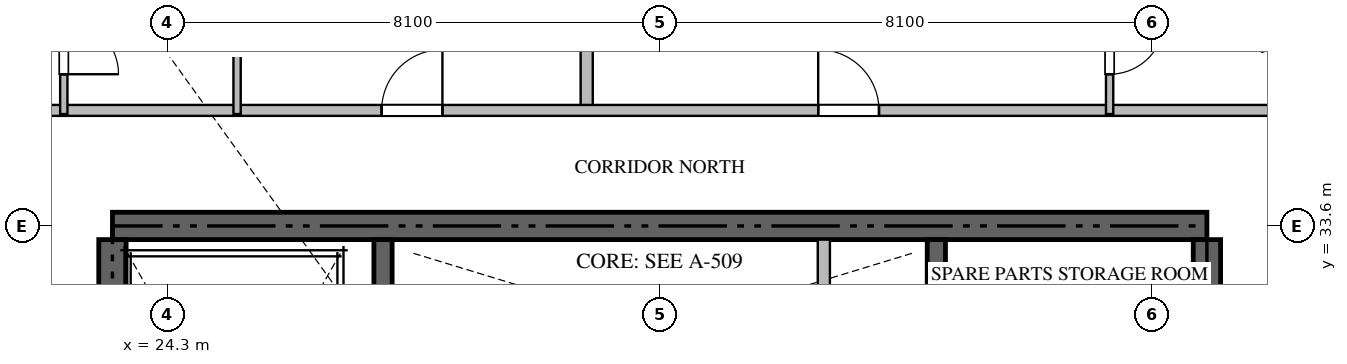
"""IFC4 building model, lengths in metres.
Left out: names, types, materials, properties, quantities, classifications, styles, units other than length and angle.
Written with IfcOpenShell. Run it as: python <this file> out.ifc"""

import sys

from ifc_helpers import new_model, si_unit, direction, frame, frame_2d, origin, place, context, subcontext, project, spatial, rectangle, extrude, source, transform, mapped, element, fill, save


model = new_model("IFC4")
c1 = context("Model", 3, precision=1e-05, world=origin(), true_north=direction((0.0, 1.0)))
c2 = subcontext(c1, "Body", "Model", "MODEL_VIEW")
j1 = project(units=[si_unit("LENGTHUNIT", "METRE"), si_unit("PLANEANGLEUNIT", "RADIAN")], contexts=[c1])
p1 = place(None, origin())
s1 = spatial("IfcSite", under=j1, at=p1, CompositionType="ELEMENT")
p2 = place(p1, origin())
s2 = spatial("IfcBuilding", under=s1, at=p2, CompositionType="ELEMENT")
p3 = place(p2, frame((0.0, 0.0, 64.2)))
s3 = spatial("IfcBuildingStorey", under=s2, at=p3, CompositionType="ELEMENT", Elevation=64.2)
p4 = place(p3, frame((41.4, 33.6, -0.26), z_axis=(0.0, 0.0, 1.0), x_axis=(-1.0, 0.0, 0.0)))
e1 = element("IfcWall", 1, at=p4, inside=s3, PredefinedType="SHEAR", context=c2, shape_type="SweptSolid", body=[
    extrude(rectangle(XDim=18.0, YDim=0.45, at=frame_2d((9.0, 0.0))), origin(), (0.0, 0.0, 1.0), 3.748),
])
p5 = place(p3, frame((23.4, 24.25, -0.26), z_axis=(0.0, 0.0, 1.0), x_axis=(0.0, 1.0, 0.0)))
e2 = element("IfcWall", 2, at=p5, inside=s3, PredefinedType="SHEAR", context=c2, shape_type="SweptSolid", body=[
    extrude(rectangle(XDim=9.125, YDim=0.45, at=frame_2d((4.562, 0.0))), origin(), (0.0, 0.0, 1.0), 3.748),
])
p6 = place(p3, frame((41.4, 27.75, -0.26), z_axis=(0.0, 0.0, 1.0), x_axis=(0.0, 1.0, 0.0)))
e3 = element("IfcWall", 3, at=p6, inside=s3, PredefinedType="SHEAR", context=c2, shape_type="SweptSolid", body=[
    extrude(rectangle(XDim=5.625, YDim=0.45, at=frame_2d((2.812, 0.0))), origin(), (0.0, 0.0, 1.0), 3.748),
])
p7 = place(p3, frame((27.85, 23.55, -0.26), z_axis=(0.0, 0.0, 1.0), x_axis=(0.0, 1.0, 0.0)))
e4 = element("IfcWall", 4, at=p7, inside=s3, PredefinedType="SHEAR", context=c2, shape_type="SweptSolid", body=[
    extrude(rectangle(XDim=9.825, YDim=0.3, at=frame_2d((4.913, 0.0))), origin(), (0.0, 0.0, 1.0), 3.748),
])
p8 = place(p3, frame((36.95, 27.05, -0.26), z_axis=(0.0, 0.0, 1.0), x_axis=(0.0, 1.0, 0.0)))
e5 = element("IfcWall", 5, at=p8, inside=s3, PredefinedType="SHEAR", context=c2, shape_type="SweptSolid", body=[
    extrude(rectangle(XDim=6.325, YDim=0.3, at=frame_2d((3.163, 0.0))), origin(), (0.0, 0.0, 1.0), 3.748),
])
p9 = place(p3, frame((35.1, 30.75, 0.0), z_axis=(0.0, 0.0, 1.0), x_axis=(0.0, 1.0, 0.0)))
e6 = element("IfcWall", 6, at=p9, inside=s3, PredefinedType="STANDARD", context=c2, shape_type="SweptSolid", body=[
    extrude(rectangle(XDim=2.625, YDim=0.2, at=frame_2d((1.312, 0.0))), origin(), (0.0, 0.0, 1.0), 3.49),
])
p10 = place(p3, frame((31.2, 35.5, 0.0), z_axis=(0.0, 0.0, 1.0), x_axis=(0.0, 1.0, 0.0)))
e7 = element("IfcWall", 7, at=p10, inside=s3, PredefinedType="PARTITIONING", context=c2, shape_type="SweptSolid", body=[
    extrude(rectangle(XDim=14.618, YDim=0.2, at=frame_2d((7.309, 0.0))), origin(), (0.0, 0.0, 1.0), 3.49),
])
p11 = place(p3, frame((21.402, 35.5, 0.0), z_axis=(0.0, 0.0, 1.0), x_axis=(1.0, 0.0, 0.0)))
e8 = element("IfcWall", 8, at=p11, inside=s3, PredefinedType="PARTITIONING", context=c2, shape_type="SweptSolid", body=[
    extrude(rectangle(XDim=21.996, YDim=0.18, at=frame_2d((10.998, 0.0))), origin(), (0.0, 0.0, 1.0), 3.49),
])
p12 = place(p11, frame((6.425, 0.0, 0.0)))
e9 = element("IfcOpeningElement", 9, at=p12, cuts=e8, PredefinedType="OPENING", context=c2, shape_type="SweptSolid", body=[
    extrude(rectangle(XDim=1.0, YDim=2.15, at=frame_2d((0.5, 1.075))), frame((0.0, 0.1, 0.0), z_axis=(0.0, -1.0, 0.0), x_axis=(1.0, 0.0, 0.0)), (0.0, 0.0, 1.0), 0.2),
])
p13 = place(p11, frame((13.605, 0.0, 0.0)))
e10 = element("IfcOpeningElement", 10, at=p13, cuts=e8, PredefinedType="OPENING", context=c2, shape_type="SweptSolid", body=[
    extrude(rectangle(XDim=1.0, YDim=2.15, at=frame_2d((0.5, 1.075))), frame((0.0, 0.1, 0.0), z_axis=(0.0, -1.0, 0.0), x_axis=(1.0, 0.0, 0.0)), (0.0, 0.0, 1.0), 0.2),
])
p14 = place(p3, frame((25.45, 38.25, 0.0), z_axis=(0.0, 0.0, 1.0), x_axis=(0.0, -1.0, 0.0)))
e11 = element("IfcWall", 11, at=p14, inside=s3, PredefinedType="PARTITIONING", context=c2, shape_type="SweptSolid", body=[
    extrude(rectangle(XDim=2.81, YDim=0.12, at=frame_2d((1.405, 0.0))), origin(), (0.0, 0.0, 1.0), 3.49),
])
p15 = place(p3, frame((22.6, 37.65, 0.0), z_axis=(0.0, 0.0, 1.0), x_axis=(0.0, -1.0, 0.0)))
e12 = element("IfcWall", 12, at=p15, inside=s3, PredefinedType="PARTITIONING", context=c2, shape_type="SweptSolid", body=[
    extrude(rectangle(XDim=2.21, YDim=0.12, at=frame_2d((1.105, 0.0))), origin(), (0.0, 0.0, 1.0), 3.49),
])
p16 = place(p15, frame((0.655, 0.0, 0.0)))
e13 = element("IfcOpeningElement", 13, at=p16, cuts=e12, PredefinedType="OPENING", context=c2, shape_type="SweptSolid", body=[
    extrude(rectangle(XDim=0.9, YDim=2.1, at=frame_2d((0.45, 1.05))), frame((0.0, 0.07, 0.0), z_axis=(0.0, -1.0, 0.0), x_axis=(1.0, 0.0, 0.0)), (0.0, 0.0, 1.0), 0.14),
])
p17 = place(p3, frame((39.8, 37.65, 0.0), z_axis=(0.0, 0.0, 1.0), x_axis=(0.0, -1.0, 0.0)))
e14 = element("IfcWall", 14, at=p17, inside=s3, PredefinedType="PARTITIONING", context=c2, shape_type="SweptSolid", body=[
    extrude(rectangle(XDim=2.21, YDim=0.12, at=frame_2d((1.105, 0.0))), origin(), (0.0, 0.0, 1.0), 3.49),
])
p18 = place(p17, frame((0.655, 0.0, 0.0)))
e15 = element("IfcOpeningElement", 15, at=p18, cuts=e14, PredefinedType="OPENING", context=c2, shape_type="SweptSolid", body=[
    extrude(rectangle(XDim=0.9, YDim=2.1, at=frame_2d((0.45, 1.05))), frame((0.0, 0.07, 0.0), z_axis=(0.0, -1.0, 0.0), x_axis=(1.0, 0.0, 0.0)), (0.0, 0.0, 1.0), 0.14),
])
m1 = source(origin(), c2, "Body", "SweptSolid", [
    extrude(rectangle(XDim=1.0, YDim=2.15, at=frame_2d((0.5, 1.075))), frame((0.0, 0.025, 0.0), z_axis=(0.0, -1.0, 0.0), x_axis=(1.0, 0.0, 0.0)), (0.0, 0.0, 1.0), 0.05),
])
p19 = place(p12, origin())
e16 = element("IfcDoor", 16, at=p19, inside=s3, OperationType="SINGLE_SWING_RIGHT", PredefinedType="DOOR", context=c2, shape_type="MappedRepresentation", body=[
    mapped(m1, transform((0.0, 0.0, 0.0), scale=1.0)),
])
fill(e9, e16)
p20 = place(p13, origin())
e17 = element("IfcDoor", 17, at=p20, inside=s3, OperationType="SINGLE_SWING_LEFT", PredefinedType="DOOR", context=c2, shape_type="MappedRepresentation", body=[
    mapped(m1, transform((0.0, 0.0, 0.0), scale=1.0)),
])
fill(e10, e17)
m2 = source(origin(), c2, "Body", "SweptSolid", [
    extrude(rectangle(XDim=0.9, YDim=2.1, at=frame_2d((0.45, 1.05))), frame((0.0, 0.025, 0.0), z_axis=(0.0, -1.0, 0.0), x_axis=(1.0, 0.0, 0.0)), (0.0, 0.0, 1.0), 0.05),
])
p21 = place(p16, origin())
e18 = element("IfcDoor", 18, at=p21, inside=s3, OperationType="SINGLE_SWING_RIGHT", PredefinedType="DOOR", context=c2, shape_type="MappedRepresentation", body=[
    mapped(m2, transform((0.0, 0.0, 0.0), scale=1.0)),
])
fill(e13, e18)
p22 = place(p18, origin())
e19 = element("IfcDoor", 19, at=p22, inside=s3, OperationType="SINGLE_SWING_LEFT", PredefinedType="DOOR", context=c2, shape_type="MappedRepresentation", body=[
    mapped(m2, transform((0.0, 0.0, 0.0), scale=1.0)),
])
fill(e15, e19)
save(model, sys.argv[1])
